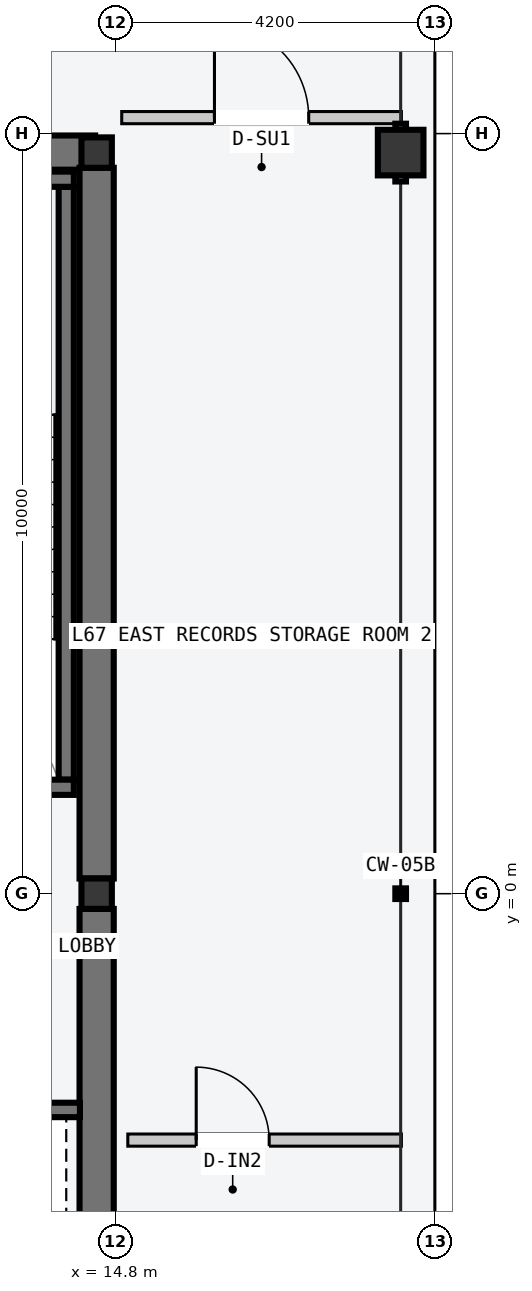
"""IFC4 building model, lengths in metres.
Left out: names, types, materials, properties, quantities, classifications, styles, units other than length and angle.
Written with IfcOpenShell. Run it as: python <this file> out.ifc"""

import sys

from ifc_helpers import new_model, si_unit, direction, frame, frame_2d, origin, origin_2d, place, context, subcontext, project, spatial, rectangle, hollow_rectangle, i_section, extrude, element, fill, save


model = new_model("IFC4")
c1 = context("Model", 3, precision=1e-05, world=origin(), true_north=direction((0.0, 1.0)))
c2 = subcontext(c1, "Body", "Model", "MODEL_VIEW")
j1 = project(units=[si_unit("LENGTHUNIT", "METRE"), si_unit("PLANEANGLEUNIT", "RADIAN")], contexts=[c1])
p1 = place(None, origin())
s1 = spatial("IfcSite", under=j1, at=p1, CompositionType="ELEMENT")
p2 = place(p1, origin())
s2 = spatial("IfcBuilding", under=s1, at=p2, CompositionType="ELEMENT")
p3 = place(p2, frame((0.0, 0.0, 254.4)))
s3 = spatial("IfcBuildingStorey", under=s2, at=p3, CompositionType="ELEMENT", Elevation=254.4)
p4 = place(p3, frame((8.07, 9.75, -0.2), z_axis=(0.0, 0.0, 1.0), x_axis=(1.0, 0.0, 0.0)))
e1 = element("IfcWall", 1, at=p4, inside=s3, PredefinedType="SHEAR", context=c2, shape_type="SweptSolid", body=[
    extrude(rectangle(XDim=6.46, YDim=0.45, at=frame_2d((3.23, 0.0))), origin(), (0.0, 0.0, 1.0), 3.6),
])
for number, where, z_axis, x_axis in (
    (2, (14.55, -9.55, -0.2), (0.0, 0.0, 1.0), (0.0, 1.0, 0.0)),
    (3, (14.55, 0.2, -0.2), (0.0, 0.0, 1.0), (0.0, 1.0, 0.0)),
):
    element("IfcWall", number, at=place(p3, frame(where, z_axis=z_axis, x_axis=x_axis)), inside=s3, PredefinedType="SHEAR", context=c2, shape_type="SweptSolid", body=[
        extrude(rectangle(XDim=9.35, YDim=0.45, at=frame_2d((4.675, 0.0))), origin(), (0.0, 0.0, 1.0), 3.6),
    ])
p5 = place(p3, frame((14.15, 1.5, -0.2), z_axis=(0.0, 0.0, 1.0), x_axis=(0.0, 1.0, 0.0)))
e4 = element("IfcWall", 4, at=p5, inside=s3, PredefinedType="SOLIDWALL", context=c2, shape_type="SweptSolid", body=[
    extrude(rectangle(XDim=7.8, YDim=0.2, at=frame_2d((3.9, 0.0))), origin(), (0.0, 0.0, 1.0), 3.6),
])
p6 = place(p3, frame((10.53, 1.4, -0.2), z_axis=(0.0, 0.0, 1.0), x_axis=(1.0, 0.0, 0.0)))
e5 = element("IfcWall", 5, at=p6, inside=s3, PredefinedType="SOLIDWALL", context=c2, shape_type="SweptSolid", body=[
    extrude(rectangle(XDim=3.72, YDim=0.2, at=frame_2d((1.86, 0.0))), origin(), (0.0, 0.0, 1.0), 3.6),
])
p7 = place(p6, frame((1.5, 0.0, 0.2)))
e6 = element("IfcOpeningElement", 6, at=p7, cuts=e5, PredefinedType="OPENING", context=c2, shape_type="SweptSolid", body=[
    extrude(rectangle(XDim=1.12, YDim=2.18, at=frame_2d((0.56, 1.09))), frame((0.0, 0.11, 0.0), z_axis=(0.0, -1.0, 0.0), x_axis=(1.0, 0.0, 0.0)), (0.0, 0.0, 1.0), 0.22),
])
p8 = place(p3, frame((10.53, 9.4, -0.2), z_axis=(0.0, 0.0, 1.0), x_axis=(1.0, 0.0, 0.0)))
e7 = element("IfcWall", 7, at=p8, inside=s3, PredefinedType="SOLIDWALL", context=c2, shape_type="SweptSolid", body=[
    extrude(rectangle(XDim=3.72, YDim=0.2, at=frame_2d((1.86, 0.0))), origin(), (0.0, 0.0, 1.0), 3.6),
])
for number, where, z_axis, x_axis in (
    (8, (14.55, 0.0, 0.0), (0.0, 0.0, 1.0), (1.0, 0.0, 0.0)),
    (9, (14.55, 9.75, 0.0), (0.0, 0.0, 1.0), (1.0, 0.0, 0.0)),
):
    element("IfcColumn", number, at=place(p3, frame(where, z_axis=z_axis, x_axis=x_axis)), inside=s3, PredefinedType="COLUMN", context=c2, shape_type="SweptSolid", body=[
        extrude(i_section(OverallWidth=0.4, OverallDepth=0.4, WebThickness=0.013, FlangeThickness=0.021, at=origin_2d()), origin(), (0.0, 0.0, 1.0), 3.6),
    ])
p9 = place(p3, frame((18.55, 9.75, 0.0), z_axis=(0.0, 0.0, 1.0), x_axis=(0.0, 1.0, 0.0)))
e10 = element("IfcColumn", 10, at=p9, inside=s3, PredefinedType="COLUMN", context=c2, shape_type="SweptSolid", body=[
    extrude(hollow_rectangle(XDim=0.6, YDim=0.6, WallThickness=0.025, at=origin_2d()), origin(), (0.0, 0.0, 1.0), 3.6),
])
p10 = place(p3, frame((11.65, -2.845, -0.2), z_axis=(0.0, 0.0, 1.0), x_axis=(1.0, 0.0, 0.0)))
e11 = element("IfcWall", 11, at=p10, inside=s3, PredefinedType="SOLIDWALL", context=c2, shape_type="SweptSolid", body=[
    extrude(rectangle(XDim=2.68, YDim=0.19, at=frame_2d((1.34, 0.0))), origin(), (0.0, 0.0, 1.0), 3.6),
])
p11 = place(p10, frame((0.65, 0.0, 0.2)))
e12 = element("IfcOpeningElement", 12, at=p11, cuts=e11, PredefinedType="OPENING", context=c2, shape_type="SweptSolid", body=[
    extrude(rectangle(XDim=1.2, YDim=2.2, at=frame_2d((0.6, 1.1))), frame((0.0, 0.105, 0.0), z_axis=(0.0, -1.0, 0.0), x_axis=(1.0, 0.0, 0.0)), (0.0, 0.0, 1.0), 0.21),
])
p12 = place(p3, frame((14.88, 10.21, 0.0), z_axis=(0.0, 0.0, 1.0), x_axis=(1.0, 0.0, 0.0)))
e13 = element("IfcWall", 13, at=p12, inside=s3, PredefinedType="PARTITIONING", context=c2, shape_type="SweptSolid", body=[
    extrude(rectangle(XDim=3.68, YDim=0.16, at=frame_2d((1.84, 0.0))), origin(), (0.0, 0.0, 1.0), 3.4),
])
p13 = place(p12, frame((1.22, 0.0, 0.0)))
e14 = element("IfcOpeningElement", 14, at=p13, cuts=e13, PredefinedType="OPENING", context=c2, shape_type="SweptSolid", body=[
    extrude(rectangle(XDim=1.24, YDim=2.24, at=frame_2d((0.62, 1.12))), frame((0.0, 0.09, 0.0), z_axis=(0.0, -1.0, 0.0), x_axis=(1.0, 0.0, 0.0)), (0.0, 0.0, 1.0), 0.18),
])
p14 = place(p3, frame((14.96, -3.242, 0.0), z_axis=(0.0, 0.0, 1.0), x_axis=(1.0, 0.0, 0.0)))
e15 = element("IfcWall", 15, at=p14, inside=s3, PredefinedType="PARTITIONING", context=c2, shape_type="SweptSolid", body=[
    extrude(rectangle(XDim=3.6, YDim=0.16, at=frame_2d((1.8, 0.0))), origin(), (0.0, 0.0, 1.0), 3.05),
])
p15 = place(p14, frame((0.9, 0.0, 0.0)))
e16 = element("IfcOpeningElement", 16, at=p15, cuts=e15, PredefinedType="OPENING", context=c2, shape_type="SweptSolid", body=[
    extrude(rectangle(XDim=0.96, YDim=2.18, at=frame_2d((0.48, 1.09))), frame((0.0, 0.09, 0.0), z_axis=(0.0, -1.0, 0.0), x_axis=(1.0, 0.0, 0.0)), (0.0, 0.0, 1.0), 0.18),
])
p16 = place(p13, origin())
e17 = element("IfcDoor", 17, at=p16, inside=s3, OperationType="SINGLE_SWING_LEFT", PredefinedType="DOOR", context=c2, shape_type="SweptSolid", body=[
    extrude(rectangle(XDim=1.24, YDim=2.24, at=frame_2d((0.62, 1.12))), frame((0.0, 0.025, 0.0), z_axis=(0.0, -1.0, 0.0), x_axis=(1.0, 0.0, 0.0)), (0.0, 0.0, 1.0), 0.05),
])
fill(e14, e17)
p17 = place(p15, origin())
e18 = element("IfcDoor", 18, at=p17, inside=s3, OperationType="SINGLE_SWING_LEFT", PredefinedType="DOOR", context=c2, shape_type="SweptSolid", body=[
    extrude(rectangle(XDim=0.96, YDim=2.18, at=frame_2d((0.48, 1.09))), frame((0.0, 0.025, 0.0), z_axis=(0.0, -1.0, 0.0), x_axis=(1.0, 0.0, 0.0)), (0.0, 0.0, 1.0), 0.05),
])
fill(e16, e18)
save(model, sys.argv[1])
